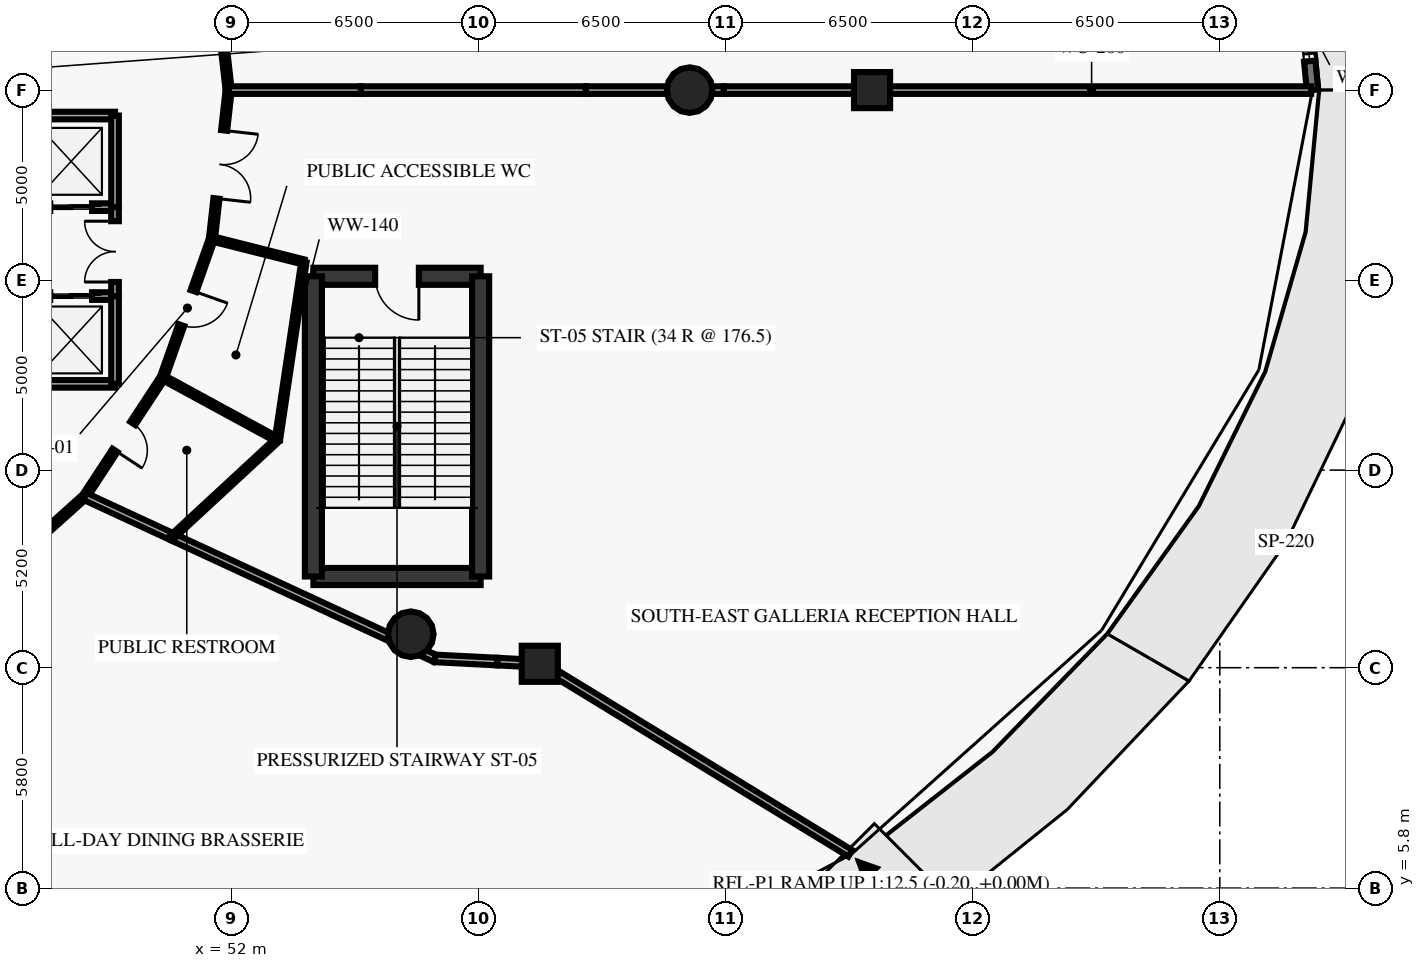
"""IFC4 building model, lengths in metres.
Left out: names, types, materials, properties, quantities, classifications, styles, units other than length and angle.
Written with IfcOpenShell. Run it as: python <this file> out.ifc"""

import sys

from ifc_helpers import new_model, si_unit, direction, frame, frame_2d, origin, origin_2d, place, context, subcontext, project, spatial, rectangle, circle, extrude, element, fill, save


model = new_model("IFC4")
c1 = context("Model", 3, precision=1e-05, world=origin(), true_north=direction((0.0, 1.0)))
c2 = subcontext(c1, "Body", "Model", "MODEL_VIEW")
j1 = project(units=[si_unit("LENGTHUNIT", "METRE"), si_unit("PLANEANGLEUNIT", "RADIAN")], contexts=[c1])
p1 = place(None, origin())
s1 = spatial("IfcSite", under=j1, at=p1, CompositionType="ELEMENT")
p2 = place(p1, origin())
s2 = spatial("IfcBuilding", under=s1, at=p2, CompositionType="ELEMENT")
p3 = place(p2, origin())
s3 = spatial("IfcBuildingStorey", under=s2, at=p3, CompositionType="ELEMENT", Elevation=0.0)
for number, where, z_axis, x_axis in (
    (1, (64.05, 26.8, 0.0), (0.0, 0.0, 1.0), (1.0, 0.0, 0.0)),
    (2, (56.713, 12.481, 0.0), (0.0, 0.0, 1.0), (1.0, 0.0, 0.0)),
):
    element("IfcColumn", number, at=place(p3, frame(where, z_axis=z_axis, x_axis=x_axis)), inside=s3, PredefinedType="COLUMN", context=c2, shape_type="SweptSolid", body=[
        extrude(circle(Radius=0.6, at=origin_2d()), origin(), (0.0, 0.0, 1.0), 5.7),
    ])
for number, where, z_axis, x_axis in (
    (3, (68.85, 26.8, 0.0), (0.0, 0.0, 1.0), (1.0, 0.0, 0.0)),
    (4, (60.107, 11.703, 0.0), (0.0, 0.0, 1.0), (1.0, 0.0, 0.0)),
):
    element("IfcColumn", number, at=place(p3, frame(where, z_axis=z_axis, x_axis=x_axis)), inside=s3, PredefinedType="COLUMN", context=c2, shape_type="SweptSolid", body=[
        extrude(rectangle(XDim=0.95, YDim=0.95, at=origin_2d()), origin(), (0.0, 0.0, 1.0), 5.7),
    ])
p4 = place(p3, frame((80.085, 30.512, 0.0), z_axis=(0.0, 0.0, 1.0), x_axis=(0.09519839492, -0.995458319371, 0.0)))
e5 = element("IfcWall", 5, at=p4, inside=s3, PredefinedType="STANDARD", context=c2, shape_type="SweptSolid", body=[
    extrude(rectangle(XDim=3.729, YDim=0.3, at=frame_2d((1.864, 0.0))), origin(), (0.0, 0.0, 1.0), 5.7),
])
p5 = place(p4, frame((0.964, 0.0, 0.9)))
e6 = element("IfcOpeningElement", 6, at=p5, cuts=e5, PredefinedType="OPENING", context=c2, shape_type="SweptSolid", body=[
    extrude(rectangle(XDim=1.8, YDim=2.4, at=frame_2d((0.9, 1.2))), frame((0.0, 0.16, 0.0), z_axis=(0.0, -1.0, 0.0), x_axis=(1.0, 0.0, 0.0)), (0.0, 0.0, 1.0), 0.32),
])
p6 = place(p4, frame((0.764, 0.0, 3.4)))
e7 = element("IfcOpeningElement", 7, at=p6, cuts=e5, PredefinedType="OPENING", context=c2, shape_type="SweptSolid", body=[
    extrude(rectangle(XDim=2.2, YDim=1.3, at=frame_2d((1.1, 0.65))), frame((0.0, 0.16, 0.0), z_axis=(0.0, -1.0, 0.0), x_axis=(1.0, 0.0, 0.0)), (0.0, 0.0, 1.0), 0.32),
])
p7 = place(p3, frame((54.15, 14.0, 0.0), z_axis=(0.0, 0.0, 1.0), x_axis=(1.0, 0.0, 0.0)))
e8 = element("IfcWall", 8, at=p7, inside=s3, PredefinedType="SHEAR", context=c2, shape_type="SweptSolid", body=[
    extrude(rectangle(XDim=4.4, YDim=0.45, at=frame_2d((2.2, 0.0))), origin(), (0.0, 0.0, 1.0), 5.7),
])
p8 = place(p3, frame((54.15, 21.9, 0.0), z_axis=(0.0, 0.0, 1.0), x_axis=(1.0, 0.0, 0.0)))
e9 = element("IfcWall", 9, at=p8, inside=s3, PredefinedType="SHEAR", context=c2, shape_type="SweptSolid", body=[
    extrude(rectangle(XDim=4.4, YDim=0.45, at=frame_2d((2.2, 0.0))), origin(), (0.0, 0.0, 1.0), 5.7),
])
p9 = place(p8, frame((1.625, 0.0, 0.0)))
e10 = element("IfcOpeningElement", 10, at=p9, cuts=e9, PredefinedType="OPENING", context=c2, shape_type="SweptSolid", body=[
    extrude(rectangle(XDim=1.15, YDim=2.15, at=frame_2d((0.575, 1.075))), frame((0.0, 0.235, 0.0), z_axis=(0.0, -1.0, 0.0), x_axis=(1.0, 0.0, 0.0)), (0.0, 0.0, 1.0), 0.47),
])
for number, where, z_axis, x_axis in (
    (11, (54.15, 14.0, 0.0), (0.0, 0.0, 1.0), (0.0, 1.0, 0.0)),
    (12, (58.55, 14.0, 0.0), (0.0, 0.0, 1.0), (0.0, 1.0, 0.0)),
):
    element("IfcWall", number, at=place(p3, frame(where, z_axis=z_axis, x_axis=x_axis)), inside=s3, PredefinedType="SHEAR", context=c2, shape_type="SweptSolid", body=[
        extrude(rectangle(XDim=7.9, YDim=0.45, at=frame_2d((3.95, 0.0))), origin(), (0.0, 0.0, 1.0), 5.7),
    ])
p10 = place(p3, frame((46.62, 23.72, 0.0), z_axis=(0.0, 0.0, 1.0), x_axis=(1.0, 0.0, 0.0)))
e13 = element("IfcWall", 13, at=p10, inside=s3, PredefinedType="SOLIDWALL", context=c2, shape_type="SweptSolid", body=[
    extrude(rectangle(XDim=2.31, YDim=0.2, at=frame_2d((1.155, 0.0))), origin(), (0.0, 0.0, 1.0), 5.7),
])
p11 = place(p10, frame((0.605, 0.0, 0.0)))
e14 = element("IfcOpeningElement", 14, at=p11, cuts=e13, PredefinedType="OPENING", context=c2, shape_type="SweptSolid", body=[
    extrude(rectangle(XDim=1.1, YDim=2.15, at=frame_2d((0.55, 1.075))), frame((0.0, 0.11, 0.0), z_axis=(0.0, -1.0, 0.0), x_axis=(1.0, 0.0, 0.0)), (0.0, 0.0, 1.0), 0.22),
])
p12 = place(p3, frame((46.62, 26.13, 0.0), z_axis=(0.0, 0.0, 1.0), x_axis=(1.0, 0.0, 0.0)))
e15 = element("IfcWall", 15, at=p12, inside=s3, PredefinedType="SOLIDWALL", context=c2, shape_type="SweptSolid", body=[
    extrude(rectangle(XDim=2.31, YDim=0.2, at=frame_2d((1.155, 0.0))), origin(), (0.0, 0.0, 1.0), 5.7),
])
p13 = place(p3, frame((48.93, 23.72, 0.0), z_axis=(0.0, 0.0, 1.0), x_axis=(0.0, 1.0, 0.0)))
e16 = element("IfcWall", 16, at=p13, inside=s3, PredefinedType="SOLIDWALL", context=c2, shape_type="SweptSolid", body=[
    extrude(rectangle(XDim=2.41, YDim=0.2, at=frame_2d((1.205, 0.0))), origin(), (0.0, 0.0, 1.0), 5.7),
])
p14 = place(p3, frame((46.62, 19.07, 0.0), z_axis=(0.0, 0.0, 1.0), x_axis=(1.0, 0.0, 0.0)))
e17 = element("IfcWall", 17, at=p14, inside=s3, PredefinedType="SOLIDWALL", context=c2, shape_type="SweptSolid", body=[
    extrude(rectangle(XDim=2.31, YDim=0.2, at=frame_2d((1.155, 0.0))), origin(), (0.0, 0.0, 1.0), 5.7),
])
p15 = place(p3, frame((46.62, 21.38, 0.0), z_axis=(0.0, 0.0, 1.0), x_axis=(1.0, 0.0, 0.0)))
e18 = element("IfcWall", 18, at=p15, inside=s3, PredefinedType="SOLIDWALL", context=c2, shape_type="SweptSolid", body=[
    extrude(rectangle(XDim=2.31, YDim=0.2, at=frame_2d((1.155, 0.0))), origin(), (0.0, 0.0, 1.0), 5.7),
])
p16 = place(p15, frame((0.605, 0.0, 0.0)))
e19 = element("IfcOpeningElement", 19, at=p16, cuts=e18, PredefinedType="OPENING", context=c2, shape_type="SweptSolid", body=[
    extrude(rectangle(XDim=1.1, YDim=2.15, at=frame_2d((0.55, 1.075))), frame((0.0, 0.11, 0.0), z_axis=(0.0, -1.0, 0.0), x_axis=(1.0, 0.0, 0.0)), (0.0, 0.0, 1.0), 0.22),
])
p17 = place(p3, frame((48.93, 19.07, 0.0), z_axis=(0.0, 0.0, 1.0), x_axis=(0.0, 1.0, 0.0)))
e20 = element("IfcWall", 20, at=p17, inside=s3, PredefinedType="SOLIDWALL", context=c2, shape_type="SweptSolid", body=[
    extrude(rectangle(XDim=2.31, YDim=0.2, at=frame_2d((1.155, 0.0))), origin(), (0.0, 0.0, 1.0), 5.7),
])
p18 = place(p3, frame((48.93, 23.72, 0.0), z_axis=(0.0, 0.0, 1.0), x_axis=(0.0, -1.0, 0.0)))
e21 = element("IfcWall", 21, at=p18, inside=s3, PredefinedType="SOLIDWALL", context=c2, shape_type="SweptSolid", body=[
    extrude(rectangle(XDim=2.34, YDim=0.2, at=frame_2d((1.17, 0.0))), origin(), (0.0, 0.0, 1.0), 5.7),
])
p19 = place(p18, frame((0.37, 0.0, 0.0)))
e22 = element("IfcOpeningElement", 22, at=p19, cuts=e21, PredefinedType="OPENING", context=c2, shape_type="SweptSolid", body=[
    extrude(rectangle(XDim=1.6, YDim=2.2, at=frame_2d((0.8, 1.1))), frame((0.0, 0.11, 0.0), z_axis=(0.0, -1.0, 0.0), x_axis=(1.0, 0.0, 0.0)), (0.0, 0.0, 1.0), 0.22),
])
p20 = place(p3, frame((51.92, 26.8, 0.0), z_axis=(0.0, 0.0, 1.0), x_axis=(-0.111731247657, 0.993738460711, 0.0)))
e23 = element("IfcWall", 23, at=p20, inside=s3, PredefinedType="PARTITIONING", context=c2, shape_type="SweptSolid", body=[
    extrude(rectangle(XDim=3.938, YDim=0.16, at=frame_2d((1.969, 0.0))), origin(), (0.0, 0.0, 1.0), 5.7),
])
p21 = place(p3, frame((45.46, 13.706, 0.0), z_axis=(0.0, 0.0, 1.0), x_axis=(0.744066617248, 0.668105432621, 0.0)))
e24 = element("IfcWall", 24, at=p21, inside=s3, PredefinedType="PARTITIONING", context=c2, shape_type="SweptSolid", body=[
    extrude(rectangle(XDim=3.596, YDim=0.16, at=frame_2d((1.798, 0.0))), origin(), (0.0, 0.0, 1.0), 5.7),
])
p22 = place(p3, frame((50.189, 19.24, 0.0), z_axis=(0.0, 0.0, 1.0), x_axis=(-0.548318837904, -0.836269365694, 0.0)))
e25 = element("IfcWall", 25, at=p22, inside=s3, PredefinedType="PARTITIONING", context=c2, shape_type="SweptSolid", body=[
    extrude(rectangle(XDim=3.744, YDim=0.16, at=frame_2d((1.872, 0.0))), origin(), (0.0, 0.0, 1.0), 5.7),
])
p23 = place(p22, frame((1.447, 0.0, 0.0)))
e26 = element("IfcOpeningElement", 26, at=p23, cuts=e25, PredefinedType="OPENING", context=c2, shape_type="SweptSolid", body=[
    extrude(rectangle(XDim=0.85, YDim=2.1, at=frame_2d((0.425, 1.05))), frame((0.0, 0.09, 0.0), z_axis=(0.0, -1.0, 0.0), x_axis=(1.0, 0.0, 0.0)), (0.0, 0.0, 1.0), 0.18),
])
p24 = place(p3, frame((51.48, 22.887, 0.0), z_axis=(0.0, 0.0, 1.0), x_axis=(-0.333704620558, -0.942677689467, 0.0)))
e27 = element("IfcWall", 27, at=p24, inside=s3, PredefinedType="PARTITIONING", context=c2, shape_type="SweptSolid", body=[
    extrude(rectangle(XDim=3.869, YDim=0.16, at=frame_2d((1.934, 0.0))), origin(), (0.0, 0.0, 1.0), 5.7),
])
p25 = place(p24, frame((1.459, 0.0, 0.0)))
e28 = element("IfcOpeningElement", 28, at=p25, cuts=e27, PredefinedType="OPENING", context=c2, shape_type="SweptSolid", body=[
    extrude(rectangle(XDim=0.95, YDim=2.1, at=frame_2d((0.475, 1.05))), frame((0.0, 0.09, 0.0), z_axis=(0.0, -1.0, 0.0), x_axis=(1.0, 0.0, 0.0)), (0.0, 0.0, 1.0), 0.18),
])
p26 = place(p3, frame((51.92, 26.8, 0.0), z_axis=(0.0, 0.0, 1.0), x_axis=(-0.111724363671, -0.99373923469, 0.0)))
e29 = element("IfcWall", 29, at=p26, inside=s3, PredefinedType="PARTITIONING", context=c2, shape_type="SweptSolid", body=[
    extrude(rectangle(XDim=3.938, YDim=0.16, at=frame_2d((1.969, 0.0))), origin(), (0.0, 0.0, 1.0), 5.7),
])
p27 = place(p26, frame((1.069, 0.0, 0.0)))
e30 = element("IfcOpeningElement", 30, at=p27, cuts=e29, PredefinedType="OPENING", context=c2, shape_type="SweptSolid", body=[
    extrude(rectangle(XDim=1.8, YDim=2.3, at=frame_2d((0.9, 1.15))), frame((0.0, 0.09, 0.0), z_axis=(0.0, -1.0, 0.0), x_axis=(1.0, 0.0, 0.0)), (0.0, 0.0, 1.0), 0.18),
])
p28 = place(p3, frame((51.92, 26.8, 0.0), z_axis=(0.0, 0.0, 1.0), x_axis=(1.0, 0.0, 0.0)))
e31 = element("IfcWall", 31, at=p28, inside=s3, PredefinedType="PARTITIONING", context=c2, shape_type="SweptSolid", body=[
    extrude(rectangle(XDim=3.48, YDim=0.2, at=frame_2d((1.74, 0.0))), origin(), (0.0, 0.0, 1.0), 5.7),
])
p29 = place(p3, frame((55.4, 26.8, 0.0), z_axis=(0.0, 0.0, 1.0), x_axis=(1.0, 0.0, 0.0)))
e32 = element("IfcWall", 32, at=p29, inside=s3, PredefinedType="PARTITIONING", context=c2, shape_type="SweptSolid", body=[
    extrude(rectangle(XDim=5.917, YDim=0.2, at=frame_2d((2.958, 0.0))), origin(), (0.0, 0.0, 1.0), 5.7),
])
p30 = place(p3, frame((61.317, 26.8, 0.0), z_axis=(0.0, 0.0, 1.0), x_axis=(1.0, 0.0, 0.0)))
e33 = element("IfcWall", 33, at=p30, inside=s3, PredefinedType="PARTITIONING", context=c2, shape_type="SweptSolid", body=[
    extrude(rectangle(XDim=3.633, YDim=0.2, at=frame_2d((1.816, 0.0))), origin(), (0.0, 0.0, 1.0), 4.66),
])
p31 = place(p3, frame((64.95, 26.8, 0.0), z_axis=(0.0, 0.0, 1.0), x_axis=(1.0, 0.0, 0.0)))
e34 = element("IfcWall", 34, at=p31, inside=s3, PredefinedType="PARTITIONING", context=c2, shape_type="SweptSolid", body=[
    extrude(rectangle(XDim=3.9, YDim=0.2, at=frame_2d((1.95, 0.0))), origin(), (0.0, 0.0, 1.0), 5.24),
])
p32 = place(p3, frame((68.85, 26.8, 0.0), z_axis=(0.0, 0.0, 1.0), x_axis=(1.0, 0.0, 0.0)))
e35 = element("IfcWall", 35, at=p32, inside=s3, PredefinedType="PARTITIONING", context=c2, shape_type="SweptSolid", body=[
    extrude(rectangle(XDim=11.555, YDim=0.2, at=frame_2d((5.777, 0.0))), origin(), (0.0, 0.0, 1.0), 5.7),
])
p33 = place(p3, frame((48.136, 16.109, 0.0), z_axis=(0.0, 0.0, 1.0), x_axis=(0.907508335547, -0.420034071133, 0.0)))
e36 = element("IfcWall", 36, at=p33, inside=s3, PredefinedType="PARTITIONING", context=c2, shape_type="SweptSolid", body=[
    extrude(rectangle(XDim=2.538, YDim=0.2, at=frame_2d((1.269, 0.0))), origin(), (0.0, 0.0, 1.0), 5.7),
])
p34 = place(p3, frame((50.439, 15.043, 0.0), z_axis=(0.0, 0.0, 1.0), x_axis=(0.907524397356, -0.419999366908, 0.0)))
e37 = element("IfcWall", 37, at=p34, inside=s3, PredefinedType="PARTITIONING", context=c2, shape_type="SweptSolid", body=[
    extrude(rectangle(XDim=7.614, YDim=0.2, at=frame_2d((3.807, 0.0))), origin(), (0.0, 0.0, 1.0), 5.7),
])
p35 = place(p3, frame((57.349, 11.845, 0.0), z_axis=(0.0, 0.0, 1.0), x_axis=(0.998692725363, -0.051115949639, 0.0)))
e38 = element("IfcWall", 38, at=p35, inside=s3, PredefinedType="PARTITIONING", context=c2, shape_type="SweptSolid", body=[
    extrude(rectangle(XDim=1.643, YDim=0.2, at=frame_2d((0.822, 0.0))), origin(), (0.0, 0.0, 1.0), 5.7),
])
p36 = place(p3, frame((58.99, 11.761, 0.0), z_axis=(0.0, 0.0, 1.0), x_axis=(0.998649603439, -0.051951607785, 0.0)))
e39 = element("IfcWall", 39, at=p36, inside=s3, PredefinedType="PARTITIONING", context=c2, shape_type="SweptSolid", body=[
    extrude(rectangle(XDim=1.118, YDim=0.2, at=frame_2d((0.559, 0.0))), origin(), (0.0, 0.0, 1.0), 5.24),
])
p37 = place(p3, frame((60.107, 11.703, 0.0), z_axis=(0.0, 0.0, 1.0), x_axis=(0.853545862143, -0.5210177168, 0.0)))
e40 = element("IfcWall", 40, at=p37, inside=s3, PredefinedType="PARTITIONING", context=c2, shape_type="SweptSolid", body=[
    extrude(rectangle(XDim=9.573, YDim=0.2, at=frame_2d((4.787, 0.0))), origin(), (0.0, 0.0, 1.0), 5.7),
])
p38 = place(p3, frame((50.189, 19.24, 0.0), z_axis=(0.0, 0.0, 1.0), x_axis=(0.878392721738, -0.477939563541, 0.0)))
e41 = element("IfcWall", 41, at=p38, inside=s3, PredefinedType="PARTITIONING", context=c2, shape_type="SweptSolid", body=[
    extrude(rectangle(XDim=3.431, YDim=0.14, at=frame_2d((1.716, 0.0))), origin(), (0.0, 0.0, 1.0), 5.7),
])
p39 = place(p3, frame((51.48, 22.887, 0.0), z_axis=(0.0, 0.0, 1.0), x_axis=(0.969564374521, -0.244836524357, 0.0)))
e42 = element("IfcWall", 42, at=p39, inside=s3, PredefinedType="PARTITIONING", context=c2, shape_type="SweptSolid", body=[
    extrude(rectangle(XDim=2.496, YDim=0.14, at=frame_2d((1.248, 0.0))), origin(), (0.0, 0.0, 1.0), 5.7),
])
p40 = place(p3, frame((50.439, 15.043, 0.0), z_axis=(0.0, 0.0, 1.0), x_axis=(0.734032370371, 0.679114481695, 0.0)))
e43 = element("IfcWall", 43, at=p40, inside=s3, PredefinedType="PARTITIONING", context=c2, shape_type="SweptSolid", body=[
    extrude(rectangle(XDim=3.765, YDim=0.14, at=frame_2d((1.883, 0.0))), origin(), (0.0, 0.0, 1.0), 5.7),
])
p41 = place(p3, frame((53.203, 17.6, 0.0), z_axis=(0.0, 0.0, 1.0), x_axis=(0.147441370436, 0.989070797407, 0.0)))
e44 = element("IfcWall", 44, at=p41, inside=s3, PredefinedType="PARTITIONING", context=c2, shape_type="SweptSolid", body=[
    extrude(rectangle(XDim=4.728, YDim=0.14, at=frame_2d((2.364, 0.0))), origin(), (0.0, 0.0, 1.0), 5.7),
])
p42 = place(p5, origin())
e45 = element("IfcWindow", 45, at=p42, inside=s3, PartitioningType="DOUBLE_PANEL_VERTICAL", PredefinedType="WINDOW", context=c2, shape_type="SweptSolid", body=[
    extrude(rectangle(XDim=1.8, YDim=2.4, at=frame_2d((0.9, 1.2))), frame((0.0, 0.03, 0.0), z_axis=(0.0, -1.0, 0.0), x_axis=(1.0, 0.0, 0.0)), (0.0, 0.0, 1.0), 0.06),
])
fill(e6, e45)
p43 = place(p6, origin())
e46 = element("IfcWindow", 46, at=p43, inside=s3, PartitioningType="DOUBLE_PANEL_HORIZONTAL", PredefinedType="WINDOW", context=c2, shape_type="SweptSolid", body=[
    extrude(rectangle(XDim=2.2, YDim=1.3, at=frame_2d((1.1, 0.65))), frame((0.0, 0.03, 0.0), z_axis=(0.0, -1.0, 0.0), x_axis=(1.0, 0.0, 0.0)), (0.0, 0.0, 1.0), 0.06),
])
fill(e7, e46)
p44 = place(p9, origin())
e47 = element("IfcDoor", 47, at=p44, inside=s3, OperationType="SINGLE_SWING_RIGHT", PredefinedType="DOOR", context=c2, shape_type="SweptSolid", body=[
    extrude(rectangle(XDim=1.15, YDim=2.15, at=frame_2d((0.575, 1.075))), frame((0.0, 0.025, 0.0), z_axis=(0.0, -1.0, 0.0), x_axis=(1.0, 0.0, 0.0)), (0.0, 0.0, 1.0), 0.05),
])
fill(e10, e47)
p45 = place(p11, origin())
e48 = element("IfcDoor", 48, at=p45, inside=s3, OperationType="DOUBLE_DOOR_SLIDING", PredefinedType="DOOR", context=c2, shape_type="SweptSolid", body=[
    extrude(rectangle(XDim=1.1, YDim=2.15, at=frame_2d((0.55, 1.075))), frame((0.0, 0.025, 0.0), z_axis=(0.0, -1.0, 0.0), x_axis=(1.0, 0.0, 0.0)), (0.0, 0.0, 1.0), 0.05),
])
fill(e14, e48)
p46 = place(p16, origin())
e49 = element("IfcDoor", 49, at=p46, inside=s3, OperationType="DOUBLE_DOOR_SLIDING", PredefinedType="DOOR", context=c2, shape_type="SweptSolid", body=[
    extrude(rectangle(XDim=1.1, YDim=2.15, at=frame_2d((0.55, 1.075))), frame((0.0, 0.025, 0.0), z_axis=(0.0, -1.0, 0.0), x_axis=(1.0, 0.0, 0.0)), (0.0, 0.0, 1.0), 0.05),
])
fill(e19, e49)
p47 = place(p19, origin())
e50 = element("IfcDoor", 50, at=p47, inside=s3, OperationType="DOUBLE_DOOR_SINGLE_SWING", PredefinedType="DOOR", context=c2, shape_type="SweptSolid", body=[
    extrude(rectangle(XDim=1.6, YDim=2.2, at=frame_2d((0.8, 1.1))), frame((0.0, 0.025, 0.0), z_axis=(0.0, -1.0, 0.0), x_axis=(1.0, 0.0, 0.0)), (0.0, 0.0, 1.0), 0.05),
])
fill(e22, e50)
p48 = place(p23, origin())
e51 = element("IfcDoor", 51, at=p48, inside=s3, OperationType="SINGLE_SWING_RIGHT", PredefinedType="DOOR", context=c2, shape_type="SweptSolid", body=[
    extrude(rectangle(XDim=0.85, YDim=2.1, at=frame_2d((0.425, 1.05))), frame((0.0, 0.025, 0.0), z_axis=(0.0, -1.0, 0.0), x_axis=(1.0, 0.0, 0.0)), (0.0, 0.0, 1.0), 0.05),
])
fill(e26, e51)
p49 = place(p25, origin())
e52 = element("IfcDoor", 52, at=p49, inside=s3, OperationType="SINGLE_SWING_LEFT", PredefinedType="DOOR", context=c2, shape_type="SweptSolid", body=[
    extrude(rectangle(XDim=0.95, YDim=2.1, at=frame_2d((0.475, 1.05))), frame((0.0, 0.025, 0.0), z_axis=(0.0, -1.0, 0.0), x_axis=(1.0, 0.0, 0.0)), (0.0, 0.0, 1.0), 0.05),
])
fill(e28, e52)
p50 = place(p27, origin())
e53 = element("IfcDoor", 53, at=p50, inside=s3, OperationType="DOUBLE_DOOR_SINGLE_SWING", PredefinedType="DOOR", context=c2, shape_type="SweptSolid", body=[
    extrude(rectangle(XDim=1.8, YDim=2.3, at=frame_2d((0.9, 1.15))), frame((0.0, 0.025, 0.0), z_axis=(0.0, -1.0, 0.0), x_axis=(1.0, 0.0, 0.0)), (0.0, 0.0, 1.0), 0.05),
])
fill(e30, e53)
save(model, sys.argv[1])
